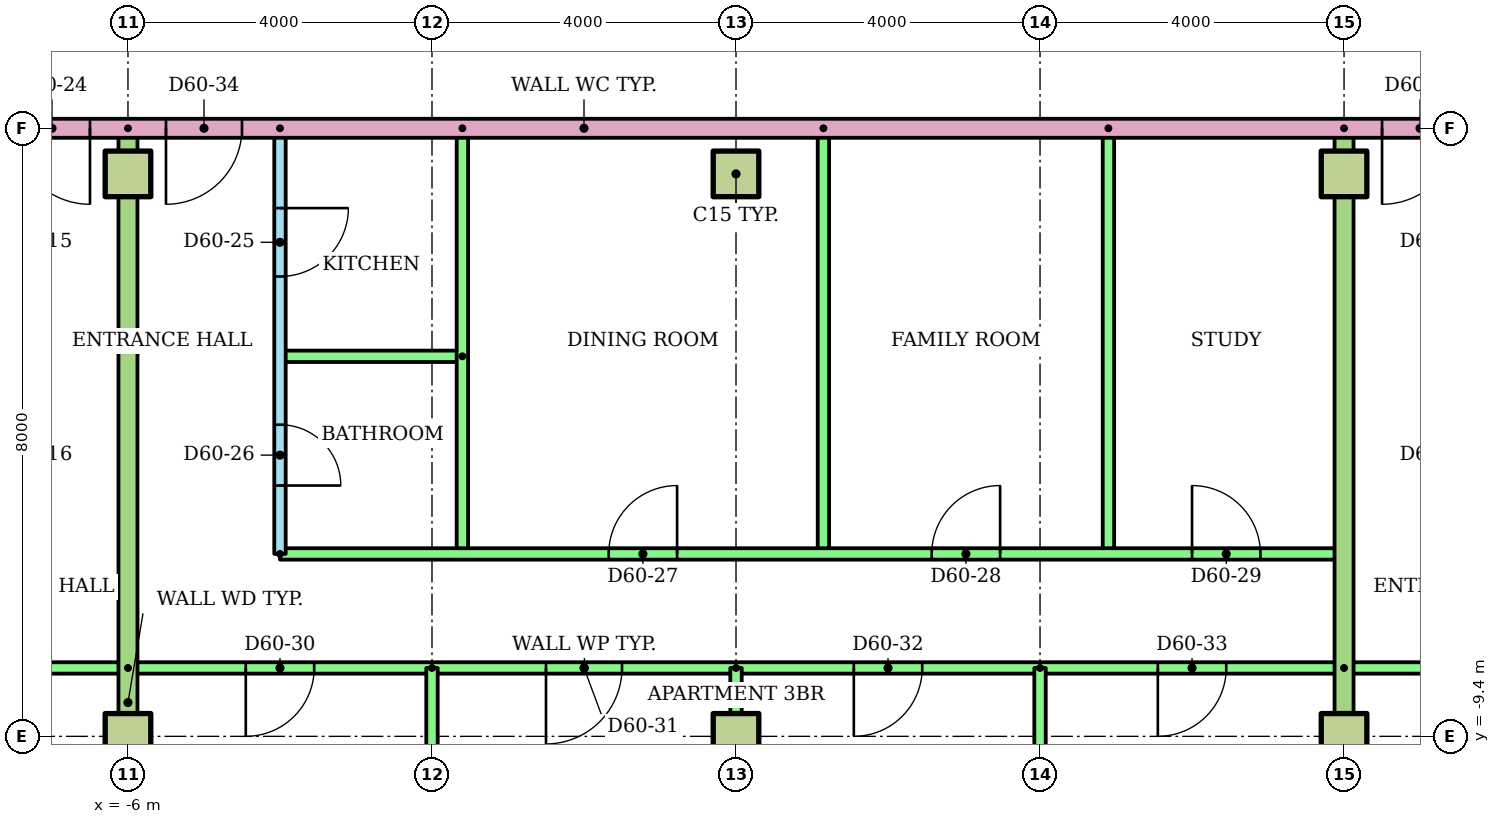
"""IFC4 building model, lengths in metres.
Left out: names, types, materials, properties, quantities, classifications, styles, units other than length and angle.
Written with IfcOpenShell. Run it as: python <this file> out.ifc"""

import sys

from ifc_helpers import new_model, si_unit, direction, frame, frame_2d, origin, origin_2d, place, context, subcontext, project, spatial, rectangle, extrude, element, fill, save


model = new_model("IFC4")
c1 = context("Model", 3, precision=1e-05, world=origin(), true_north=direction((0.0, 1.0)))
c2 = subcontext(c1, "Body", "Model", "MODEL_VIEW")
j1 = project(units=[si_unit("LENGTHUNIT", "METRE"), si_unit("PLANEANGLEUNIT", "RADIAN")], contexts=[c1])
p1 = place(None, origin())
s1 = spatial("IfcSite", under=j1, at=p1, CompositionType="ELEMENT")
p2 = place(p1, origin())
s2 = spatial("IfcBuilding", under=s1, at=p2, CompositionType="ELEMENT")
p3 = place(p2, frame((0.0, 0.0, 230.0)))
s3 = spatial("IfcBuildingStorey", under=s2, at=p3, CompositionType="ELEMENT", Elevation=230.0)
for number, where in (
    (1, (-6.0, -9.4, 0.0)),
    (2, (2.0, -9.4, 0.0)),
    (3, (10.0, -9.4, 0.0)),
    (4, (-6.0, -2.0, 0.0)),
    (5, (2.0, -2.0, 0.0)),
    (6, (10.0, -2.0, 0.0)),
):
    element("IfcColumn", number, at=place(p3, frame(where)), inside=s3, PredefinedType="COLUMN", context=c2, shape_type="SweptSolid", body=[
        extrude(rectangle(XDim=0.6, YDim=0.6, at=origin_2d()), origin(), (0.0, 0.0, 1.0), 3.2),
    ])
p4 = place(p3, frame((-6.0, -8.5, 0.0), z_axis=(0.0, 0.0, 1.0), x_axis=(-1.0, 0.0, 0.0)))
e7 = element("IfcWall", 7, at=p4, inside=s3, PredefinedType="PARTITIONING", context=c2, shape_type="SweptSolid", body=[
    extrude(rectangle(XDim=22.91, YDim=0.15, at=frame_2d((11.455, 0.0))), origin(), (0.0, 0.0, 1.0), 2.4),
])
p5 = place(p4, frame((20.0, 0.0, 0.0)))
e8 = element("IfcOpeningElement", 8, at=p5, cuts=e7, PredefinedType="OPENING", context=c2, shape_type="SweptSolid", body=[
    extrude(rectangle(XDim=0.9, YDim=2.1, at=frame_2d((0.45, 1.05))), frame((0.0, 0.085, 0.0), z_axis=(0.0, -1.0, 0.0), x_axis=(1.0, 0.0, 0.0)), (0.0, 0.0, 1.0), 0.17),
])
p6 = place(p4, frame((12.6, 0.0, 0.0)))
e9 = element("IfcOpeningElement", 9, at=p6, cuts=e7, PredefinedType="OPENING", context=c2, shape_type="SweptSolid", body=[
    extrude(rectangle(XDim=1.0, YDim=2.1, at=frame_2d((0.5, 1.05))), frame((0.0, 0.085, 0.0), z_axis=(0.0, -1.0, 0.0), x_axis=(1.0, 0.0, 0.0)), (0.0, 0.0, 1.0), 0.17),
])
p7 = place(p4, frame((5.55, 0.0, 0.0)))
e10 = element("IfcOpeningElement", 10, at=p7, cuts=e7, PredefinedType="OPENING", context=c2, shape_type="SweptSolid", body=[
    extrude(rectangle(XDim=0.9, YDim=2.1, at=frame_2d((0.45, 1.05))), frame((0.0, 0.085, 0.0), z_axis=(0.0, -1.0, 0.0), x_axis=(1.0, 0.0, 0.0)), (0.0, 0.0, 1.0), 0.17),
])
p8 = place(p4, frame((1.55, 0.0, 0.0)))
e11 = element("IfcOpeningElement", 11, at=p8, cuts=e7, PredefinedType="OPENING", context=c2, shape_type="SweptSolid", body=[
    extrude(rectangle(XDim=0.9, YDim=2.1, at=frame_2d((0.45, 1.05))), frame((0.0, 0.085, 0.0), z_axis=(0.0, -1.0, 0.0), x_axis=(1.0, 0.0, 0.0)), (0.0, 0.0, 1.0), 0.17),
])
p9 = place(p3, frame((-4.0, -1.4, 0.0), z_axis=(0.0, 0.0, 1.0), x_axis=(0.0, -1.0, 0.0)))
e12 = element("IfcWall", 12, at=p9, inside=s3, PredefinedType="PARTITIONING", context=c2, shape_type="SweptSolid", body=[
    extrude(rectangle(XDim=5.6, YDim=0.15, at=frame_2d((2.8, 0.0))), origin(), (0.0, 0.0, 1.0), 2.4),
])
p10 = place(p9, frame((1.05, 0.0, 0.0)))
e13 = element("IfcOpeningElement", 13, at=p10, cuts=e12, PredefinedType="OPENING", context=c2, shape_type="SweptSolid", body=[
    extrude(rectangle(XDim=0.9, YDim=2.1, at=frame_2d((0.45, 1.05))), frame((0.0, 0.085, 0.0), z_axis=(0.0, -1.0, 0.0), x_axis=(1.0, 0.0, 0.0)), (0.0, 0.0, 1.0), 0.17),
])
p11 = place(p9, frame((3.9, 0.0, 0.0)))
e14 = element("IfcOpeningElement", 14, at=p11, cuts=e12, PredefinedType="OPENING", context=c2, shape_type="SweptSolid", body=[
    extrude(rectangle(XDim=0.8, YDim=2.1, at=frame_2d((0.4, 1.05))), frame((0.0, 0.085, 0.0), z_axis=(0.0, -1.0, 0.0), x_axis=(1.0, 0.0, 0.0)), (0.0, 0.0, 1.0), 0.17),
])
p12 = place(p3, frame((-1.6, -4.4, 0.0), z_axis=(0.0, 0.0, 1.0), x_axis=(-1.0, 0.0, 0.0)))
e15 = element("IfcWall", 15, at=p12, inside=s3, PredefinedType="PARTITIONING", context=c2, shape_type="SweptSolid", body=[
    extrude(rectangle(XDim=2.4, YDim=0.15, at=frame_2d((1.2, 0.0))), origin(), (0.0, 0.0, 1.0), 2.4),
])
for number, where, z_axis, x_axis in (
    (16, (-1.6, -1.4, 0.0), (0.0, 0.0, 1.0), (0.0, -1.0, 0.0)),
    (17, (3.15, -1.4, 0.0), (0.0, 0.0, 1.0), (0.0, -1.0, 0.0)),
    (18, (6.9, -1.4, 0.0), (0.0, 0.0, 1.0), (0.0, -1.0, 0.0)),
):
    element("IfcWall", number, at=place(p3, frame(where, z_axis=z_axis, x_axis=x_axis)), inside=s3, PredefinedType="PARTITIONING", context=c2, shape_type="SweptSolid", body=[
        extrude(rectangle(XDim=5.6, YDim=0.15, at=frame_2d((2.8, 0.0))), origin(), (0.0, 0.0, 1.0), 2.4),
    ])
p13 = place(p3, frame((-4.0, -7.0, 0.0)))
e19 = element("IfcWall", 19, at=p13, inside=s3, PredefinedType="PARTITIONING", context=c2, shape_type="SweptSolid", body=[
    extrude(rectangle(XDim=14.0, YDim=0.15, at=frame_2d((7.0, 0.0))), origin(), (0.0, 0.0, 1.0), 2.4),
])
p14 = place(p13, frame((4.325, 0.0, 0.0)))
e20 = element("IfcOpeningElement", 20, at=p14, cuts=e19, PredefinedType="OPENING", context=c2, shape_type="SweptSolid", body=[
    extrude(rectangle(XDim=0.9, YDim=2.1, at=frame_2d((0.45, 1.05))), frame((0.0, 0.085, 0.0), z_axis=(0.0, -1.0, 0.0), x_axis=(1.0, 0.0, 0.0)), (0.0, 0.0, 1.0), 0.17),
])
p15 = place(p13, frame((8.575, 0.0, 0.0)))
e21 = element("IfcOpeningElement", 21, at=p15, cuts=e19, PredefinedType="OPENING", context=c2, shape_type="SweptSolid", body=[
    extrude(rectangle(XDim=0.9, YDim=2.1, at=frame_2d((0.45, 1.05))), frame((0.0, 0.085, 0.0), z_axis=(0.0, -1.0, 0.0), x_axis=(1.0, 0.0, 0.0)), (0.0, 0.0, 1.0), 0.17),
])
p16 = place(p13, frame((12.0, 0.0, 0.0)))
e22 = element("IfcOpeningElement", 22, at=p16, cuts=e19, PredefinedType="OPENING", context=c2, shape_type="SweptSolid", body=[
    extrude(rectangle(XDim=0.9, YDim=2.1, at=frame_2d((0.45, 1.05))), frame((0.0, 0.085, 0.0), z_axis=(0.0, -1.0, 0.0), x_axis=(1.0, 0.0, 0.0)), (0.0, 0.0, 1.0), 0.17),
])
p17 = place(p3, frame((10.0, -8.5, 0.0), z_axis=(0.0, 0.0, 1.0), x_axis=(-1.0, 0.0, 0.0)))
e23 = element("IfcWall", 23, at=p17, inside=s3, PredefinedType="PARTITIONING", context=c2, shape_type="SweptSolid", body=[
    extrude(rectangle(XDim=16.0, YDim=0.15, at=frame_2d((8.0, 0.0))), origin(), (0.0, 0.0, 1.0), 2.4),
])
p18 = place(p17, frame((13.55, 0.0, 0.0)))
e24 = element("IfcOpeningElement", 24, at=p18, cuts=e23, PredefinedType="OPENING", context=c2, shape_type="SweptSolid", body=[
    extrude(rectangle(XDim=0.9, YDim=2.1, at=frame_2d((0.45, 1.05))), frame((0.0, 0.085, 0.0), z_axis=(0.0, -1.0, 0.0), x_axis=(1.0, 0.0, 0.0)), (0.0, 0.0, 1.0), 0.17),
])
p19 = place(p17, frame((9.5, 0.0, 0.0)))
e25 = element("IfcOpeningElement", 25, at=p19, cuts=e23, PredefinedType="OPENING", context=c2, shape_type="SweptSolid", body=[
    extrude(rectangle(XDim=1.0, YDim=2.1, at=frame_2d((0.5, 1.05))), frame((0.0, 0.085, 0.0), z_axis=(0.0, -1.0, 0.0), x_axis=(1.0, 0.0, 0.0)), (0.0, 0.0, 1.0), 0.17),
])
p20 = place(p17, frame((5.55, 0.0, 0.0)))
e26 = element("IfcOpeningElement", 26, at=p20, cuts=e23, PredefinedType="OPENING", context=c2, shape_type="SweptSolid", body=[
    extrude(rectangle(XDim=0.9, YDim=2.1, at=frame_2d((0.45, 1.05))), frame((0.0, 0.085, 0.0), z_axis=(0.0, -1.0, 0.0), x_axis=(1.0, 0.0, 0.0)), (0.0, 0.0, 1.0), 0.17),
])
p21 = place(p17, frame((1.55, 0.0, 0.0)))
e27 = element("IfcOpeningElement", 27, at=p21, cuts=e23, PredefinedType="OPENING", context=c2, shape_type="SweptSolid", body=[
    extrude(rectangle(XDim=0.9, YDim=2.1, at=frame_2d((0.45, 1.05))), frame((0.0, 0.085, 0.0), z_axis=(0.0, -1.0, 0.0), x_axis=(1.0, 0.0, 0.0)), (0.0, 0.0, 1.0), 0.17),
])
p22 = place(p3, frame((-2.0, -8.5, 0.0), z_axis=(0.0, 0.0, 1.0), x_axis=(0.0, -1.0, 0.0)))
e28 = element("IfcWall", 28, at=p22, inside=s3, PredefinedType="PARTITIONING", context=c2, shape_type="SweptSolid", body=[
    extrude(rectangle(XDim=8.021, YDim=0.15, at=frame_2d((4.01, 0.0))), origin(), (0.0, 0.0, 1.0), 2.4),
])
p23 = place(p3, frame((2.0, -8.5, 0.0), z_axis=(0.0, 0.0, 1.0), x_axis=(0.0, -1.0, 0.0)))
e29 = element("IfcWall", 29, at=p23, inside=s3, PredefinedType="PARTITIONING", context=c2, shape_type="SweptSolid", body=[
    extrude(rectangle(XDim=8.01, YDim=0.15, at=frame_2d((4.005, 0.0))), origin(), (0.0, 0.0, 1.0), 2.4),
])
p24 = place(p3, frame((6.0, -8.5, 0.0), z_axis=(0.0, 0.0, 1.0), x_axis=(0.0, -1.0, 0.0)))
e30 = element("IfcWall", 30, at=p24, inside=s3, PredefinedType="PARTITIONING", context=c2, shape_type="SweptSolid", body=[
    extrude(rectangle(XDim=8.021, YDim=0.15, at=frame_2d((4.01, 0.0))), origin(), (0.0, 0.0, 1.0), 2.4),
])
p25 = place(p3, frame((-6.0, -1.4, 0.0), z_axis=(0.0, 0.0, 1.0), x_axis=(0.0, -1.0, 0.0)))
e31 = element("IfcWall", 31, at=p25, inside=s3, PredefinedType="PARTITIONING", context=c2, shape_type="SweptSolid", body=[
    extrude(rectangle(XDim=15.11, YDim=0.25, at=frame_2d((7.555, 0.0))), origin(), (0.0, 0.0, 1.0), 2.4),
])
p26 = place(p3, frame((28.92, -8.5, 0.0), z_axis=(0.0, 0.0, 1.0), x_axis=(-1.0, 0.0, 0.0)))
e32 = element("IfcWall", 32, at=p26, inside=s3, PredefinedType="PARTITIONING", context=c2, shape_type="SweptSolid", body=[
    extrude(rectangle(XDim=18.92, YDim=0.15, at=frame_2d((9.46, 0.0))), origin(), (0.0, 0.0, 1.0), 2.4),
])
p27 = place(p26, frame((16.47, 0.0, 0.0)))
e33 = element("IfcOpeningElement", 33, at=p27, cuts=e32, PredefinedType="OPENING", context=c2, shape_type="SweptSolid", body=[
    extrude(rectangle(XDim=0.9, YDim=2.1, at=frame_2d((0.45, 1.05))), frame((0.0, 0.085, 0.0), z_axis=(0.0, -1.0, 0.0), x_axis=(1.0, 0.0, 0.0)), (0.0, 0.0, 1.0), 0.17),
])
p28 = place(p26, frame((12.42, 0.0, 0.0)))
e34 = element("IfcOpeningElement", 34, at=p28, cuts=e32, PredefinedType="OPENING", context=c2, shape_type="SweptSolid", body=[
    extrude(rectangle(XDim=1.0, YDim=2.1, at=frame_2d((0.5, 1.05))), frame((0.0, 0.085, 0.0), z_axis=(0.0, -1.0, 0.0), x_axis=(1.0, 0.0, 0.0)), (0.0, 0.0, 1.0), 0.17),
])
p29 = place(p26, frame((7.37, 0.0, 0.0)))
e35 = element("IfcOpeningElement", 35, at=p29, cuts=e32, PredefinedType="OPENING", context=c2, shape_type="SweptSolid", body=[
    extrude(rectangle(XDim=0.9, YDim=2.1, at=frame_2d((0.45, 1.05))), frame((0.0, 0.085, 0.0), z_axis=(0.0, -1.0, 0.0), x_axis=(1.0, 0.0, 0.0)), (0.0, 0.0, 1.0), 0.17),
])
p30 = place(p26, frame((1.544, 0.0, 0.0)))
e36 = element("IfcOpeningElement", 36, at=p30, cuts=e32, PredefinedType="OPENING", context=c2, shape_type="SweptSolid", body=[
    extrude(rectangle(XDim=0.9, YDim=2.1, at=frame_2d((0.45, 1.05))), frame((0.0, 0.085, 0.0), z_axis=(0.0, -1.0, 0.0), x_axis=(1.0, 0.0, 0.0)), (0.0, 0.0, 1.0), 0.17),
])
p31 = place(p3, frame((10.0, -1.4, 0.0), z_axis=(0.0, 0.0, 1.0), x_axis=(0.0, -1.0, 0.0)))
e37 = element("IfcWall", 37, at=p31, inside=s3, PredefinedType="PARTITIONING", context=c2, shape_type="SweptSolid", body=[
    extrude(rectangle(XDim=15.11, YDim=0.25, at=frame_2d((7.555, 0.0))), origin(), (0.0, 0.0, 1.0), 2.4),
])
p32 = place(p3, frame((14.0, -1.4, 0.0), z_axis=(0.0, 0.0, 1.0), x_axis=(-1.0, 0.0, 0.0)))
e38 = element("IfcWall", 38, at=p32, inside=s3, PredefinedType="PARTITIONING", context=c2, shape_type="SweptSolid", body=[
    extrude(rectangle(XDim=28.0, YDim=0.25, at=frame_2d((14.0, 0.0))), origin(), (0.0, 0.0, 1.0), 2.4),
])
p33 = place(p32, frame((20.5, 0.0, 0.0)))
e39 = element("IfcOpeningElement", 39, at=p33, cuts=e38, PredefinedType="OPENING", context=c2, shape_type="SweptSolid", body=[
    extrude(rectangle(XDim=1.0, YDim=2.1, at=frame_2d((0.5, 1.05))), frame((0.0, 0.135, 0.0), z_axis=(0.0, -1.0, 0.0), x_axis=(1.0, 0.0, 0.0)), (0.0, 0.0, 1.0), 0.27),
])
p34 = place(p32, frame((18.5, 0.0, 0.0)))
e40 = element("IfcOpeningElement", 40, at=p34, cuts=e38, PredefinedType="OPENING", context=c2, shape_type="SweptSolid", body=[
    extrude(rectangle(XDim=1.0, YDim=2.1, at=frame_2d((0.5, 1.05))), frame((0.0, 0.135, 0.0), z_axis=(0.0, -1.0, 0.0), x_axis=(1.0, 0.0, 0.0)), (0.0, 0.0, 1.0), 0.27),
])
p35 = place(p32, frame((2.5, 0.0, 0.0)))
e41 = element("IfcOpeningElement", 41, at=p35, cuts=e38, PredefinedType="OPENING", context=c2, shape_type="SweptSolid", body=[
    extrude(rectangle(XDim=1.0, YDim=2.1, at=frame_2d((0.5, 1.05))), frame((0.0, 0.135, 0.0), z_axis=(0.0, -1.0, 0.0), x_axis=(1.0, 0.0, 0.0)), (0.0, 0.0, 1.0), 0.27),
])
p36 = place(p33, origin())
e42 = element("IfcDoor", 42, at=p36, inside=s3, OperationType="SINGLE_SWING_LEFT", PredefinedType="DOOR", context=c2, shape_type="SweptSolid", body=[
    extrude(rectangle(XDim=1.0, YDim=2.1, at=frame_2d((0.5, 1.05))), frame((0.0, 0.025, 0.0), z_axis=(0.0, -1.0, 0.0), x_axis=(1.0, 0.0, 0.0)), (0.0, 0.0, 1.0), 0.05),
])
fill(e39, e42)
p37 = place(p10, origin())
e43 = element("IfcDoor", 43, at=p37, inside=s3, OperationType="SINGLE_SWING_LEFT", PredefinedType="DOOR", context=c2, shape_type="SweptSolid", body=[
    extrude(rectangle(XDim=0.9, YDim=2.1, at=frame_2d((0.45, 1.05))), frame((0.0, 0.025, 0.0), z_axis=(0.0, -1.0, 0.0), x_axis=(1.0, 0.0, 0.0)), (0.0, 0.0, 1.0), 0.05),
])
fill(e13, e43)
p38 = place(p11, origin())
e44 = element("IfcDoor", 44, at=p38, inside=s3, OperationType="SINGLE_SWING_RIGHT", PredefinedType="DOOR", context=c2, shape_type="SweptSolid", body=[
    extrude(rectangle(XDim=0.8, YDim=2.1, at=frame_2d((0.4, 1.05))), frame((0.0, 0.025, 0.0), z_axis=(0.0, -1.0, 0.0), x_axis=(1.0, 0.0, 0.0)), (0.0, 0.0, 1.0), 0.05),
])
fill(e14, e44)
p39 = place(p14, origin())
e45 = element("IfcDoor", 45, at=p39, inside=s3, OperationType="SINGLE_SWING_RIGHT", PredefinedType="DOOR", context=c2, shape_type="SweptSolid", body=[
    extrude(rectangle(XDim=0.9, YDim=2.1, at=frame_2d((0.45, 1.05))), frame((0.0, 0.025, 0.0), z_axis=(0.0, -1.0, 0.0), x_axis=(1.0, 0.0, 0.0)), (0.0, 0.0, 1.0), 0.05),
])
fill(e20, e45)
p40 = place(p15, origin())
e46 = element("IfcDoor", 46, at=p40, inside=s3, OperationType="SINGLE_SWING_RIGHT", PredefinedType="DOOR", context=c2, shape_type="SweptSolid", body=[
    extrude(rectangle(XDim=0.9, YDim=2.1, at=frame_2d((0.45, 1.05))), frame((0.0, 0.025, 0.0), z_axis=(0.0, -1.0, 0.0), x_axis=(1.0, 0.0, 0.0)), (0.0, 0.0, 1.0), 0.05),
])
fill(e21, e46)
p41 = place(p16, origin())
e47 = element("IfcDoor", 47, at=p41, inside=s3, OperationType="SINGLE_SWING_LEFT", PredefinedType="DOOR", context=c2, shape_type="SweptSolid", body=[
    extrude(rectangle(XDim=0.9, YDim=2.1, at=frame_2d((0.45, 1.05))), frame((0.0, 0.025, 0.0), z_axis=(0.0, -1.0, 0.0), x_axis=(1.0, 0.0, 0.0)), (0.0, 0.0, 1.0), 0.05),
])
fill(e22, e47)
p42 = place(p18, origin())
e48 = element("IfcDoor", 48, at=p42, inside=s3, OperationType="SINGLE_SWING_RIGHT", PredefinedType="DOOR", context=c2, shape_type="SweptSolid", body=[
    extrude(rectangle(XDim=0.9, YDim=2.1, at=frame_2d((0.45, 1.05))), frame((0.0, 0.025, 0.0), z_axis=(0.0, -1.0, 0.0), x_axis=(1.0, 0.0, 0.0)), (0.0, 0.0, 1.0), 0.05),
])
fill(e24, e48)
p43 = place(p19, origin())
e49 = element("IfcDoor", 49, at=p43, inside=s3, OperationType="SINGLE_SWING_RIGHT", PredefinedType="DOOR", context=c2, shape_type="SweptSolid", body=[
    extrude(rectangle(XDim=1.0, YDim=2.1, at=frame_2d((0.5, 1.05))), frame((0.0, 0.025, 0.0), z_axis=(0.0, -1.0, 0.0), x_axis=(1.0, 0.0, 0.0)), (0.0, 0.0, 1.0), 0.05),
])
fill(e25, e49)
p44 = place(p20, origin())
e50 = element("IfcDoor", 50, at=p44, inside=s3, OperationType="SINGLE_SWING_RIGHT", PredefinedType="DOOR", context=c2, shape_type="SweptSolid", body=[
    extrude(rectangle(XDim=0.9, YDim=2.1, at=frame_2d((0.45, 1.05))), frame((0.0, 0.025, 0.0), z_axis=(0.0, -1.0, 0.0), x_axis=(1.0, 0.0, 0.0)), (0.0, 0.0, 1.0), 0.05),
])
fill(e26, e50)
p45 = place(p21, origin())
e51 = element("IfcDoor", 51, at=p45, inside=s3, OperationType="SINGLE_SWING_RIGHT", PredefinedType="DOOR", context=c2, shape_type="SweptSolid", body=[
    extrude(rectangle(XDim=0.9, YDim=2.1, at=frame_2d((0.45, 1.05))), frame((0.0, 0.025, 0.0), z_axis=(0.0, -1.0, 0.0), x_axis=(1.0, 0.0, 0.0)), (0.0, 0.0, 1.0), 0.05),
])
fill(e27, e51)
p46 = place(p34, origin())
e52 = element("IfcDoor", 52, at=p46, inside=s3, OperationType="SINGLE_SWING_RIGHT", PredefinedType="DOOR", context=c2, shape_type="SweptSolid", body=[
    extrude(rectangle(XDim=1.0, YDim=2.1, at=frame_2d((0.5, 1.05))), frame((0.0, 0.025, 0.0), z_axis=(0.0, -1.0, 0.0), x_axis=(1.0, 0.0, 0.0)), (0.0, 0.0, 1.0), 0.05),
])
fill(e40, e52)
p47 = place(p35, origin())
e53 = element("IfcDoor", 53, at=p47, inside=s3, OperationType="SINGLE_SWING_RIGHT", PredefinedType="DOOR", context=c2, shape_type="SweptSolid", body=[
    extrude(rectangle(XDim=1.0, YDim=2.1, at=frame_2d((0.5, 1.05))), frame((0.0, 0.025, 0.0), z_axis=(0.0, -1.0, 0.0), x_axis=(1.0, 0.0, 0.0)), (0.0, 0.0, 1.0), 0.05),
])
fill(e41, e53)
save(model, sys.argv[1])
